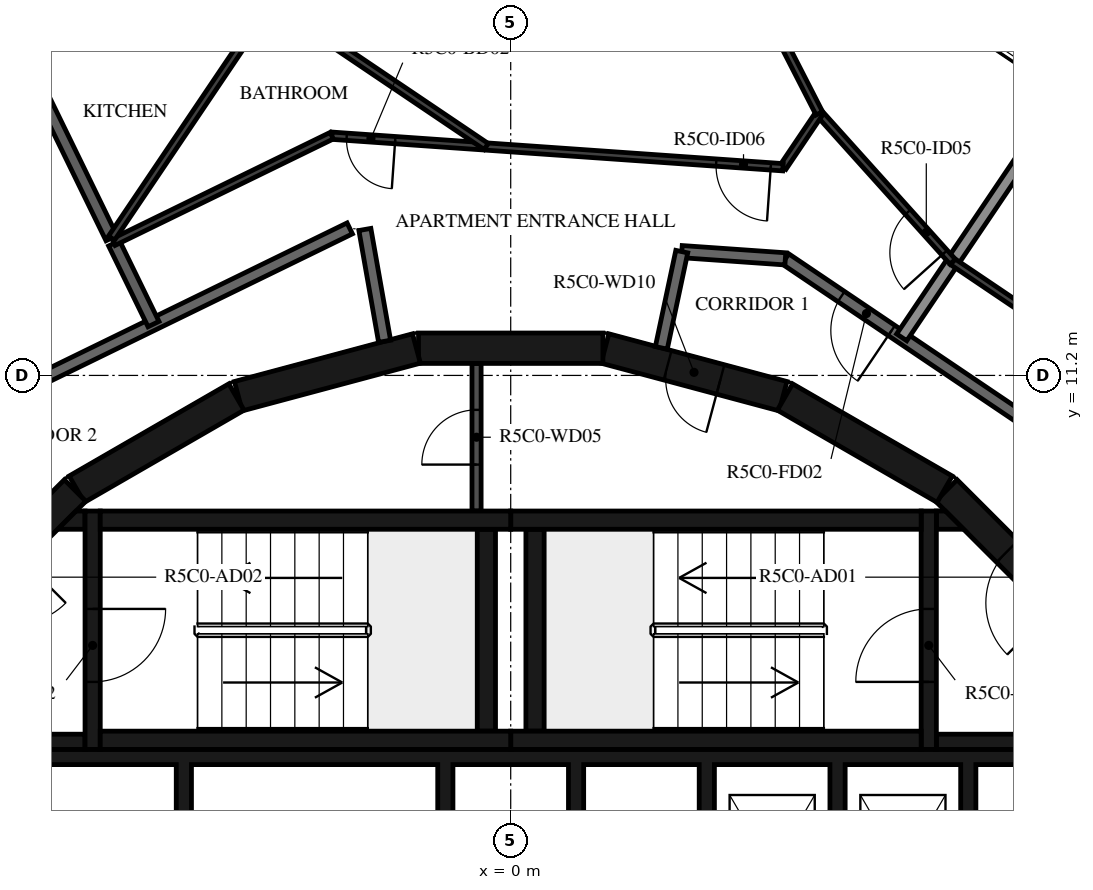
"""IFC4 building model, lengths in metres.
Left out: names, types, materials, properties, quantities, classifications, styles, units other than length and angle.
Written with IfcOpenShell. Run it as: python <this file> out.ifc"""

import sys

from ifc_helpers import new_model, si_unit, direction, frame, frame_2d, origin, place, context, subcontext, project, spatial, polyline, rectangle, outline, extrude, element, fill, save


model = new_model("IFC4")
c1 = context("Model", 3, precision=1e-05, world=origin(), true_north=direction((0.0, 1.0)))
c2 = subcontext(c1, "Body", "Model", "MODEL_VIEW")
j1 = project(units=[si_unit("LENGTHUNIT", "METRE"), si_unit("PLANEANGLEUNIT", "RADIAN")], contexts=[c1])
p1 = place(None, origin())
s1 = spatial("IfcSite", under=j1, at=p1, CompositionType="ELEMENT")
p2 = place(p1, origin())
s2 = spatial("IfcBuilding", under=s1, at=p2, CompositionType="ELEMENT")
p3 = place(p2, frame((0.0, 0.0, 209.4)))
s3 = spatial("IfcBuildingStorey", under=s2, at=p3, CompositionType="ELEMENT", Elevation=209.4)
p4 = place(p3, frame((9.308, 7.164, 0.0), z_axis=(0.0, 0.0, 1.0), x_axis=(-0.707106781187, 0.707106781187, 0.0)))
e1 = element("IfcWall", 1, at=p4, inside=s3, PredefinedType="SHEAR", context=c2, shape_type="SweptSolid", body=[
    extrude(rectangle(XDim=3.032, YDim=0.5, at=frame_2d((1.516, 0.0))), origin(), (0.0, 0.0, 1.0), 3.12),
])
p5 = place(p4, frame((0.416, 0.0, 0.0)))
e2 = element("IfcOpeningElement", 2, at=p5, cuts=e1, PredefinedType="OPENING", context=c2, shape_type="SweptSolid", body=[
    extrude(rectangle(XDim=1.2, YDim=2.1, at=frame_2d((0.6, 1.05))), frame((0.0, 0.26, 0.0), z_axis=(0.0, -1.0, 0.0), x_axis=(1.0, 0.0, 0.0)), (0.0, 0.0, 1.0), 0.52),
])
p6 = place(p3, frame((7.137, 9.329, 0.0), z_axis=(0.0, 0.0, 1.0), x_axis=(-0.865975092491, 0.500087131594, 0.0)))
e3 = element("IfcWall", 3, at=p6, inside=s3, PredefinedType="SHEAR", context=c2, shape_type="SweptSolid", body=[
    extrude(rectangle(XDim=3.033, YDim=0.5, at=frame_2d((1.516, 0.0))), origin(), (0.0, 0.0, 1.0), 3.12),
])
p7 = place(p3, frame((4.479, 10.858, 0.0), z_axis=(0.0, 0.0, 1.0), x_axis=(-0.965948410781, 0.258734743916, 0.0)))
e4 = element("IfcWall", 4, at=p7, inside=s3, PredefinedType="SHEAR", context=c2, shape_type="SweptSolid", body=[
    extrude(rectangle(XDim=3.033, YDim=0.5, at=frame_2d((1.516, 0.0))), origin(), (0.0, 0.0, 1.0), 3.12),
])
p8 = place(p7, frame((1.066, 0.0, 0.0)))
e5 = element("IfcOpeningElement", 5, at=p8, cuts=e4, PredefinedType="OPENING", context=c2, shape_type="SweptSolid", body=[
    extrude(rectangle(XDim=0.9, YDim=2.1, at=frame_2d((0.45, 1.05))), frame((0.0, 0.26, 0.0), z_axis=(0.0, -1.0, 0.0), x_axis=(1.0, 0.0, 0.0)), (0.0, 0.0, 1.0), 0.52),
])
for number, where, z_axis, x_axis in (
    (6, (1.516, 11.647, 0.0), (0.0, 0.0, 1.0), (-1.0, 0.0, 0.0)),
    (7, (-1.55, 11.643, 0.0), (0.0, 0.0, 1.0), (-0.966, -0.259, 0.0)),
    (8, (-4.51, 10.845, 0.0), (0.0, 0.0, 1.0), (-0.866, -0.5, 0.0)),
):
    element("IfcWall", number, at=place(p3, frame(where, z_axis=z_axis, x_axis=x_axis)), inside=s3, PredefinedType="SHEAR", context=c2, shape_type="SweptSolid", body=[
        extrude(rectangle(XDim=3.033, YDim=0.5, at=frame_2d((1.516, 0.0))), origin(), (0.0, 0.0, 1.0), 3.12),
    ])
p9 = place(p3, frame((-7.164, 9.308, 0.0), z_axis=(0.0, 0.0, 1.0), x_axis=(-0.707106781187, -0.707106781187, 0.0)))
e9 = element("IfcWall", 9, at=p9, inside=s3, PredefinedType="SHEAR", context=c2, shape_type="SweptSolid", body=[
    extrude(rectangle(XDim=3.032, YDim=0.5, at=frame_2d((1.516, 0.0))), origin(), (0.0, 0.0, 1.0), 3.12),
])
p10 = place(p9, frame((1.416, 0.0, 0.0)))
e10 = element("IfcOpeningElement", 10, at=p10, cuts=e9, PredefinedType="OPENING", context=c2, shape_type="SweptSolid", body=[
    extrude(rectangle(XDim=1.2, YDim=2.1, at=frame_2d((0.6, 1.05))), frame((0.0, 0.26, 0.0), z_axis=(0.0, -1.0, 0.0), x_axis=(1.0, 0.0, 0.0)), (0.0, 0.0, 1.0), 0.52),
])
for number, where, z_axis, x_axis in (
    (11, (0.0, 5.2, 0.0), (0.0, 0.0, 1.0), (1.0, 0.0, 0.0)),
    (12, (0.0, 8.82, 0.0), (0.0, 0.0, 1.0), (1.0, 0.0, 0.0)),
):
    element("IfcWall", number, at=place(p3, frame(where, z_axis=z_axis, x_axis=x_axis)), inside=s3, PredefinedType="SHEAR", context=c2, shape_type="SweptSolid", body=[
        extrude(rectangle(XDim=6.75, YDim=0.3, at=frame_2d((3.375, 0.0))), origin(), (0.0, 0.0, 1.0), 3.12),
    ])
p11 = place(p3, frame((0.4, 5.35, 0.0), z_axis=(0.0, 0.0, 1.0), x_axis=(0.0, 1.0, 0.0)))
e13 = element("IfcWall", 13, at=p11, inside=s3, PredefinedType="SHEAR", context=c2, shape_type="SweptSolid", body=[
    extrude(rectangle(XDim=3.32, YDim=0.3, at=frame_2d((1.66, 0.0))), origin(), (0.0, 0.0, 1.0), 3.12),
])
p12 = place(p3, frame((6.875, 5.05, 0.0), z_axis=(0.0, 0.0, 1.0), x_axis=(0.0, 1.0, 0.0)))
e14 = element("IfcWall", 14, at=p12, inside=s3, PredefinedType="SHEAR", context=c2, shape_type="SweptSolid", body=[
    extrude(rectangle(XDim=3.92, YDim=0.25, at=frame_2d((1.96, 0.0))), origin(), (0.0, 0.0, 1.0), 3.12),
])
p13 = place(p12, frame((1.11, 0.0, 0.0)))
e15 = element("IfcOpeningElement", 15, at=p13, cuts=e14, PredefinedType="OPENING", context=c2, shape_type="SweptSolid", body=[
    extrude(rectangle(XDim=1.2, YDim=2.1, at=frame_2d((0.6, 1.05))), frame((0.0, 0.135, 0.0), z_axis=(0.0, -1.0, 0.0), x_axis=(1.0, 0.0, 0.0)), (0.0, 0.0, 1.0), 0.27),
])
p14 = place(p3, frame((7.0, 5.175, 0.0), z_axis=(0.0, 0.0, 1.0), x_axis=(1.0, 0.0, 0.0)))
e16 = element("IfcWall", 16, at=p14, inside=s3, PredefinedType="SHEAR", context=c2, shape_type="SweptSolid", body=[
    extrude(rectangle(XDim=3.1, YDim=0.25, at=frame_2d((1.55, 0.0))), origin(), (0.0, 0.0, 1.0), 3.12),
])
p15 = place(p3, origin())
e17 = element("IfcWall", 17, at=p15, inside=s3, PredefinedType="SHEAR", context=c2, shape_type="SweptSolid", body=[
    extrude(outline(polyline([(7.448, 8.67), (7.0, 8.67), (7.0, 8.97), (7.148, 8.97), (7.448, 8.67)])), origin(), (0.0, 0.0, 1.0), 3.12),
])
for number, where, z_axis, x_axis in (
    (18, (-6.75, 5.2, 0.0), (0.0, 0.0, 1.0), (1.0, 0.0, 0.0)),
    (19, (-6.75, 8.82, 0.0), (0.0, 0.0, 1.0), (1.0, 0.0, 0.0)),
):
    element("IfcWall", number, at=place(p3, frame(where, z_axis=z_axis, x_axis=x_axis)), inside=s3, PredefinedType="SHEAR", context=c2, shape_type="SweptSolid", body=[
        extrude(rectangle(XDim=6.75, YDim=0.3, at=frame_2d((3.375, 0.0))), origin(), (0.0, 0.0, 1.0), 3.12),
    ])
p16 = place(p3, frame((-0.4, 5.35, 0.0), z_axis=(0.0, 0.0, 1.0), x_axis=(0.0, 1.0, 0.0)))
e20 = element("IfcWall", 20, at=p16, inside=s3, PredefinedType="SHEAR", context=c2, shape_type="SweptSolid", body=[
    extrude(rectangle(XDim=3.32, YDim=0.3, at=frame_2d((1.66, 0.0))), origin(), (0.0, 0.0, 1.0), 3.12),
])
p17 = place(p3, frame((-6.875, 8.97, 0.0), z_axis=(0.0, 0.0, 1.0), x_axis=(0.0, -1.0, 0.0)))
e21 = element("IfcWall", 21, at=p17, inside=s3, PredefinedType="SHEAR", context=c2, shape_type="SweptSolid", body=[
    extrude(rectangle(XDim=3.92, YDim=0.25, at=frame_2d((1.96, 0.0))), origin(), (0.0, 0.0, 1.0), 3.12),
])
p18 = place(p17, frame((1.61, 0.0, 0.0)))
e22 = element("IfcOpeningElement", 22, at=p18, cuts=e21, PredefinedType="OPENING", context=c2, shape_type="SweptSolid", body=[
    extrude(rectangle(XDim=1.2, YDim=2.1, at=frame_2d((0.6, 1.05))), frame((0.0, 0.135, 0.0), z_axis=(0.0, -1.0, 0.0), x_axis=(1.0, 0.0, 0.0)), (0.0, 0.0, 1.0), 0.27),
])
p19 = place(p3, frame((-7.0, 5.175, 0.0), z_axis=(0.0, 0.0, 1.0), x_axis=(-1.0, 0.0, 0.0)))
e23 = element("IfcWall", 23, at=p19, inside=s3, PredefinedType="SHEAR", context=c2, shape_type="SweptSolid", body=[
    extrude(rectangle(XDim=3.1, YDim=0.25, at=frame_2d((1.55, 0.0))), origin(), (0.0, 0.0, 1.0), 3.12),
])
p20 = place(p3, origin())
e24 = element("IfcWall", 24, at=p20, inside=s3, PredefinedType="SHEAR", context=c2, shape_type="SweptSolid", body=[
    extrude(outline(polyline([(-7.148, 8.97), (-7.0, 8.97), (-7.0, 8.67), (-7.448, 8.67), (-7.148, 8.97)])), origin(), (0.0, 0.0, 1.0), 3.12),
])
p21 = place(p3, origin())
e25 = element("IfcWall", 25, at=p21, inside=s3, PredefinedType="SHEAR", context=c2, shape_type="SweptSolid", body=[
    extrude(outline(polyline([(-9.55, 4.8), (-5.5, 4.8), (-5.5, 1.9), (-5.25, 1.9), (-5.25, 4.8), (-1.2, 4.8), (-1.2, 1.9), (-0.95, 1.9), (-0.95, 4.8), (0.95, 4.8), (0.95, 1.9), (1.2, 1.9), (1.2, 4.8), (3.1, 4.8), (3.1, 1.9), (3.35, 1.9), (3.35, 4.8), (5.25, 4.8), (5.25, 1.9), (5.5, 1.9), (5.5, 4.8), (7.4, 4.8), (7.4, 1.9), (7.65, 1.9), (7.65, 4.8), (9.55, 4.8), (9.55, 1.9), (9.8, 1.9), (9.8, 4.8), (9.8, 5.05), (-9.8, 5.05), (-9.8, 4.8), (-9.8, 1.9), (-9.55, 1.9), (-9.55, 4.8)])), origin(), (0.0, 0.0, 1.0), 3.12),
])
p22 = place(p3, frame((-0.562, 8.97, 0.0), z_axis=(0.0, 0.0, 1.0), x_axis=(0.0, 1.0, 0.0)))
e26 = element("IfcWall", 26, at=p22, inside=s3, PredefinedType="PARTITIONING", context=c2, shape_type="SweptSolid", body=[
    extrude(rectangle(XDim=2.427, YDim=0.15, at=frame_2d((1.214, 0.0))), origin(), (0.0, 0.0, 1.0), 3.12),
])
p23 = place(p22, frame((0.764, 0.0, 0.0)))
e27 = element("IfcOpeningElement", 27, at=p23, cuts=e26, PredefinedType="OPENING", context=c2, shape_type="SweptSolid", body=[
    extrude(rectangle(XDim=0.9, YDim=2.1, at=frame_2d((0.45, 1.05))), frame((0.0, 0.085, 0.0), z_axis=(0.0, -1.0, 0.0), x_axis=(1.0, 0.0, 0.0)), (0.0, 0.0, 1.0), 0.17),
])
p24 = place(p3, frame((10.47, 9.101, 0.0), z_axis=(0.0, 0.0, 1.0), x_axis=(-0.829035841718, 0.559195469534, 0.0)))
e28 = element("IfcWall", 28, at=p24, inside=s3, PredefinedType="STANDARD", context=c2, shape_type="SweptSolid", body=[
    extrude(rectangle(XDim=7.181, YDim=0.2, at=frame_2d((3.591, 0.0))), origin(), (0.0, 0.0, 1.0), 3.12),
])
p25 = place(p24, frame((0.2, 0.0, 0.0)))
e29 = element("IfcOpeningElement", 29, at=p25, cuts=e28, PredefinedType="OPENING", context=c2, shape_type="SweptSolid", body=[
    extrude(rectangle(XDim=1.0, YDim=2.1, at=frame_2d((0.5, 1.05))), frame((0.0, 0.11, 0.0), z_axis=(0.0, -1.0, 0.0), x_axis=(1.0, 0.0, 0.0)), (0.0, 0.0, 1.0), 0.22),
])
p26 = place(p24, frame((5.073, 0.0, 0.0)))
e30 = element("IfcOpeningElement", 30, at=p26, cuts=e28, PredefinedType="OPENING", context=c2, shape_type="SweptSolid", body=[
    extrude(rectangle(XDim=1.0, YDim=2.1, at=frame_2d((0.5, 1.05))), frame((0.0, 0.11, 0.0), z_axis=(0.0, -1.0, 0.0), x_axis=(1.0, 0.0, 0.0)), (0.0, 0.0, 1.0), 0.22),
])
p27 = place(p3, frame((4.517, 13.117, 0.0), z_axis=(0.0, 0.0, 1.0), x_axis=(-0.997562153664, 0.069783591025, 0.0)))
e31 = element("IfcWall", 31, at=p27, inside=s3, PredefinedType="STANDARD", context=c2, shape_type="SweptSolid", body=[
    extrude(rectangle(XDim=1.707, YDim=0.2, at=frame_2d((0.854, 0.0))), origin(), (0.0, 0.0, 1.0), 3.12),
])
p28 = place(p3, frame((2.813, 13.236, 0.0), z_axis=(0.0, 0.0, 1.0), x_axis=(-0.207911086063, -0.978147729278, 0.0)))
e32 = element("IfcWall", 32, at=p28, inside=s3, PredefinedType="STANDARD", context=c2, shape_type="SweptSolid", body=[
    extrude(rectangle(XDim=1.618, YDim=0.2, at=frame_2d((0.809, 0.0))), origin(), (0.0, 0.0, 1.0), 3.12),
])
p29 = place(p3, frame((-2.074, 11.761, 0.0), z_axis=(0.0, 0.0, 1.0), x_axis=(-0.173740587112, 0.984791454263, 0.0)))
e33 = element("IfcWall", 33, at=p29, inside=s3, PredefinedType="STANDARD", context=c2, shape_type="SweptSolid", body=[
    extrude(rectangle(XDim=1.867, YDim=0.2, at=frame_2d((0.934, 0.0))), origin(), (0.0, 0.0, 1.0), 3.12),
])
p30 = place(p3, frame((-2.647, 13.618, 0.0), z_axis=(0.0, 0.0, 1.0), x_axis=(-0.898796543751, -0.438366026218, 0.0)))
e34 = element("IfcWall", 34, at=p30, inside=s3, PredefinedType="STANDARD", context=c2, shape_type="SweptSolid", body=[
    extrude(rectangle(XDim=7.181, YDim=0.2, at=frame_2d((3.591, 0.0))), origin(), (0.0, 0.0, 1.0), 3.12),
])
p31 = place(p3, frame((9.104, 15.79, 0.0), z_axis=(0.0, 0.0, 1.0), x_axis=(-0.559193912135, -0.829036892201, 0.0)))
e35 = element("IfcWall", 35, at=p31, inside=s3, PredefinedType="STANDARD", context=c2, shape_type="SweptSolid", body=[
    extrude(rectangle(XDim=4.781, YDim=0.2, at=frame_2d((2.39, 0.0))), origin(), (0.0, 0.0, 1.0), 2.73),
])
p32 = place(p3, frame((-6.522, 13.373, 0.0), z_axis=(0.0, 0.0, 1.0), x_axis=(0.438277270821, -0.8988398266, 0.0)))
e36 = element("IfcWall", 36, at=p32, inside=s3, PredefinedType="STANDARD", context=c2, shape_type="SweptSolid", body=[
    extrude(rectangle(XDim=1.479, YDim=0.2, at=frame_2d((0.74, 0.0))), origin(), (0.0, 0.0, 1.0), 3.12),
])
p33 = place(p3, frame((-8.219, 16.851, 0.0), z_axis=(0.0, 0.0, 1.0), x_axis=(0.438291091101, -0.898833087654, 0.0)))
e37 = element("IfcWall", 37, at=p33, inside=s3, PredefinedType="STANDARD", context=c2, shape_type="SweptSolid", body=[
    extrude(rectangle(XDim=3.774, YDim=0.2, at=frame_2d((1.887, 0.0))), origin(), (0.0, 0.0, 1.0), 3.12),
])
p34 = place(p3, frame((11.642, 10.12, 0.0), z_axis=(0.0, 0.0, 1.0), x_axis=(-0.829054664054, 0.559167563446, 0.0)))
e38 = element("IfcWall", 38, at=p34, inside=s3, PredefinedType="PARTITIONING", context=c2, shape_type="SweptSolid", body=[
    extrude(rectangle(XDim=5.275, YDim=0.12, at=frame_2d((2.637, 0.0))), origin(), (0.0, 0.0, 1.0), 3.12),
])
p35 = place(p34, frame((0.2, 0.0, 0.0)))
e39 = element("IfcOpeningElement", 39, at=p35, cuts=e38, PredefinedType="OPENING", context=c2, shape_type="SweptSolid", body=[
    extrude(rectangle(XDim=0.9, YDim=2.1, at=frame_2d((0.45, 1.05))), frame((0.0, 0.07, 0.0), z_axis=(0.0, -1.0, 0.0), x_axis=(1.0, 0.0, 0.0)), (0.0, 0.0, 1.0), 0.14),
])
p36 = place(p3, frame((7.269, 13.07, 0.0), z_axis=(0.0, 0.0, 1.0), x_axis=(-0.668495993587, 0.743715743116, 0.0)))
e40 = element("IfcWall", 40, at=p36, inside=s3, PredefinedType="PARTITIONING", context=c2, shape_type="SweptSolid", body=[
    extrude(rectangle(XDim=3.281, YDim=0.12, at=frame_2d((1.641, 0.0))), origin(), (0.0, 0.0, 1.0), 3.12),
])
p37 = place(p36, frame((0.2, 0.0, 0.0)))
e41 = element("IfcOpeningElement", 41, at=p37, cuts=e40, PredefinedType="OPENING", context=c2, shape_type="SweptSolid", body=[
    extrude(rectangle(XDim=0.9, YDim=2.1, at=frame_2d((0.45, 1.05))), frame((0.0, 0.07, 0.0), z_axis=(0.0, -1.0, 0.0), x_axis=(1.0, 0.0, 0.0)), (0.0, 0.0, 1.0), 0.14),
])
p38 = place(p3, frame((5.075, 15.51, 0.0), z_axis=(0.0, 0.0, 1.0), x_axis=(-0.559221936342, -0.829017988896, 0.0)))
e42 = element("IfcWall", 42, at=p38, inside=s3, PredefinedType="PARTITIONING", context=c2, shape_type="SweptSolid", body=[
    extrude(rectangle(XDim=1.07, YDim=0.12, at=frame_2d((0.535, 0.0))), origin(), (0.0, 0.0, 1.0), 3.12),
])
p39 = place(p3, frame((4.477, 14.623, 0.0), z_axis=(0.0, 0.0, 1.0), x_axis=(-0.997564862172, 0.069744861884, 0.0)))
e43 = element("IfcWall", 43, at=p39, inside=s3, PredefinedType="PARTITIONING", context=c2, shape_type="SweptSolid", body=[
    extrude(rectangle(XDim=7.438, YDim=0.12, at=frame_2d((3.719, 0.0))), origin(), (0.0, 0.0, 1.0), 3.12),
])
p40 = place(p39, frame((0.2, 0.0, 0.0)))
e44 = element("IfcOpeningElement", 44, at=p40, cuts=e43, PredefinedType="OPENING", context=c2, shape_type="SweptSolid", body=[
    extrude(rectangle(XDim=0.9, YDim=2.1, at=frame_2d((0.45, 1.05))), frame((0.0, 0.07, 0.0), z_axis=(0.0, -1.0, 0.0), x_axis=(1.0, 0.0, 0.0)), (0.0, 0.0, 1.0), 0.14),
])
p41 = place(p39, frame((6.392, 0.0, 0.0)))
e45 = element("IfcOpeningElement", 45, at=p41, cuts=e43, PredefinedType="OPENING", context=c2, shape_type="SweptSolid", body=[
    extrude(rectangle(XDim=0.8, YDim=2.1, at=frame_2d((0.4, 1.05))), frame((0.0, 0.07, 0.0), z_axis=(0.0, -1.0, 0.0), x_axis=(1.0, 0.0, 0.0)), (0.0, 0.0, 1.0), 0.14),
])
p42 = place(p3, frame((-2.943, 15.142, 0.0), z_axis=(0.0, 0.0, 1.0), x_axis=(-0.89881075705, -0.438336883014, 0.0)))
e46 = element("IfcWall", 46, at=p42, inside=s3, PredefinedType="PARTITIONING", context=c2, shape_type="SweptSolid", body=[
    extrude(rectangle(XDim=3.992, YDim=0.12, at=frame_2d((1.996, 0.0))), origin(), (0.0, 0.0, 1.0), 3.12),
])
p43 = place(p3, frame((2.696, 20.148, 0.0), z_axis=(0.0, 0.0, 1.0), x_axis=(0.456387956197, -0.889780890691, 0.0)))
e47 = element("IfcWall", 47, at=p43, inside=s3, PredefinedType="PARTITIONING", context=c2, shape_type="SweptSolid", body=[
    extrude(rectangle(XDim=5.213, YDim=0.12, at=frame_2d((2.606, 0.0))), origin(), (0.0, 0.0, 1.0), 3.12),
])
p44 = place(p3, frame((-7.476, 19.735, 0.0), z_axis=(0.0, 0.0, 1.0), x_axis=(0.829035412992, -0.559196105142, 0.0)))
e48 = element("IfcWall", 48, at=p44, inside=s3, PredefinedType="PARTITIONING", context=c2, shape_type="SweptSolid", body=[
    extrude(rectangle(XDim=8.531, YDim=0.12, at=frame_2d((4.266, 0.0))), origin(), (0.0, 0.0, 1.0), 3.12),
])
p45 = place(p44, frame((2.204, 0.0, 0.0)))
e49 = element("IfcOpeningElement", 49, at=p45, cuts=e48, PredefinedType="OPENING", context=c2, shape_type="SweptSolid", body=[
    extrude(rectangle(XDim=0.9, YDim=2.1, at=frame_2d((0.45, 1.05))), frame((0.0, 0.07, 0.0), z_axis=(0.0, -1.0, 0.0), x_axis=(1.0, 0.0, 0.0)), (0.0, 0.0, 1.0), 0.14),
])
p46 = place(p3, frame((-3.939, 17.35, 0.0), z_axis=(0.0, 0.0, 1.0), x_axis=(-0.559193216274, -0.829037361566, 0.0)))
e50 = element("IfcWall", 50, at=p46, inside=s3, PredefinedType="PARTITIONING", context=c2, shape_type="SweptSolid", body=[
    extrude(rectangle(XDim=4.694, YDim=0.12, at=frame_2d((2.347, 0.0))), origin(), (0.0, 0.0, 1.0), 3.12),
])
p47 = place(p13, origin())
e51 = element("IfcDoor", 51, at=p47, inside=s3, OperationType="SINGLE_SWING_LEFT", PredefinedType="DOOR", context=c2, shape_type="SweptSolid", body=[
    extrude(rectangle(XDim=1.2, YDim=2.1, at=frame_2d((0.6, 1.05))), frame((0.0, 0.025, 0.0), z_axis=(0.0, -1.0, 0.0), x_axis=(1.0, 0.0, 0.0)), (0.0, 0.0, 1.0), 0.05),
])
fill(e15, e51)
p48 = place(p5, origin())
e52 = element("IfcDoor", 52, at=p48, inside=s3, OperationType="SINGLE_SWING_RIGHT", PredefinedType="DOOR", context=c2, shape_type="SweptSolid", body=[
    extrude(rectangle(XDim=1.2, YDim=2.1, at=frame_2d((0.6, 1.05))), frame((0.0, 0.025, 0.0), z_axis=(0.0, -1.0, 0.0), x_axis=(1.0, 0.0, 0.0)), (0.0, 0.0, 1.0), 0.05),
])
fill(e2, e52)
p49 = place(p18, origin())
e53 = element("IfcDoor", 53, at=p49, inside=s3, OperationType="SINGLE_SWING_LEFT", PredefinedType="DOOR", context=c2, shape_type="SweptSolid", body=[
    extrude(rectangle(XDim=1.2, YDim=2.1, at=frame_2d((0.6, 1.05))), frame((0.0, 0.025, 0.0), z_axis=(0.0, -1.0, 0.0), x_axis=(1.0, 0.0, 0.0)), (0.0, 0.0, 1.0), 0.05),
])
fill(e22, e53)
p50 = place(p23, origin())
e54 = element("IfcDoor", 54, at=p50, inside=s3, OperationType="SINGLE_SWING_LEFT", PredefinedType="DOOR", context=c2, shape_type="SweptSolid", body=[
    extrude(rectangle(XDim=0.9, YDim=2.1, at=frame_2d((0.45, 1.05))), frame((0.0, 0.025, 0.0), z_axis=(0.0, -1.0, 0.0), x_axis=(1.0, 0.0, 0.0)), (0.0, 0.0, 1.0), 0.05),
])
fill(e27, e54)
p51 = place(p8, origin())
e55 = element("IfcDoor", 55, at=p51, inside=s3, OperationType="SINGLE_SWING_RIGHT", PredefinedType="DOOR", context=c2, shape_type="SweptSolid", body=[
    extrude(rectangle(XDim=0.9, YDim=2.1, at=frame_2d((0.45, 1.05))), frame((0.0, 0.025, 0.0), z_axis=(0.0, -1.0, 0.0), x_axis=(1.0, 0.0, 0.0)), (0.0, 0.0, 1.0), 0.05),
])
fill(e5, e55)
p52 = place(p26, origin())
e56 = element("IfcDoor", 56, at=p52, inside=s3, OperationType="SINGLE_SWING_RIGHT", PredefinedType="DOOR", context=c2, shape_type="SweptSolid", body=[
    extrude(rectangle(XDim=1.0, YDim=2.1, at=frame_2d((0.5, 1.05))), frame((0.0, 0.025, 0.0), z_axis=(0.0, -1.0, 0.0), x_axis=(1.0, 0.0, 0.0)), (0.0, 0.0, 1.0), 0.05),
])
fill(e30, e56)
p53 = place(p37, origin())
e57 = element("IfcDoor", 57, at=p53, inside=s3, OperationType="SINGLE_SWING_RIGHT", PredefinedType="DOOR", context=c2, shape_type="SweptSolid", body=[
    extrude(rectangle(XDim=0.9, YDim=2.1, at=frame_2d((0.45, 1.05))), frame((0.0, 0.025, 0.0), z_axis=(0.0, -1.0, 0.0), x_axis=(1.0, 0.0, 0.0)), (0.0, 0.0, 1.0), 0.05),
])
fill(e41, e57)
p54 = place(p40, origin())
e58 = element("IfcDoor", 58, at=p54, inside=s3, OperationType="SINGLE_SWING_RIGHT", PredefinedType="DOOR", context=c2, shape_type="SweptSolid", body=[
    extrude(rectangle(XDim=0.9, YDim=2.1, at=frame_2d((0.45, 1.05))), frame((0.0, 0.025, 0.0), z_axis=(0.0, -1.0, 0.0), x_axis=(1.0, 0.0, 0.0)), (0.0, 0.0, 1.0), 0.05),
])
fill(e44, e58)
p55 = place(p41, origin())
e59 = element("IfcDoor", 59, at=p55, inside=s3, OperationType="SINGLE_SWING_RIGHT", PredefinedType="DOOR", context=c2, shape_type="SweptSolid", body=[
    extrude(rectangle(XDim=0.8, YDim=2.1, at=frame_2d((0.4, 1.05))), frame((0.0, 0.025, 0.0), z_axis=(0.0, -1.0, 0.0), x_axis=(1.0, 0.0, 0.0)), (0.0, 0.0, 1.0), 0.05),
])
fill(e45, e59)
save(model, sys.argv[1])
